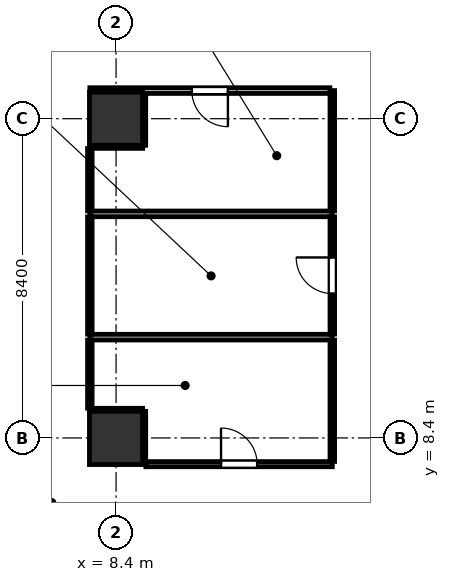
"""IFC4 building model, lengths in metres.
Left out: names, types, materials, properties, quantities, classifications, styles, units other than length and angle.
Written with IfcOpenShell. Run it as: python <this file> out.ifc"""

import sys

from ifc_helpers import new_model, si_unit, direction, frame, frame_2d, origin, origin_2d, place, context, subcontext, project, spatial, rectangle, extrude, element, fill, save


model = new_model("IFC4")
c1 = context("Model", 3, precision=1e-05, world=origin(), true_north=direction((0.0, 1.0)))
c2 = subcontext(c1, "Body", "Model", "MODEL_VIEW")
j1 = project(units=[si_unit("LENGTHUNIT", "METRE"), si_unit("PLANEANGLEUNIT", "RADIAN")], contexts=[c1])
p1 = place(None, origin())
s1 = spatial("IfcSite", under=j1, at=p1, CompositionType="ELEMENT")
p2 = place(p1, origin())
s2 = spatial("IfcBuilding", under=s1, at=p2, CompositionType="ELEMENT")
p3 = place(p2, frame((0.0, 0.0, 5.4)))
s3 = spatial("IfcBuildingStorey", under=s2, at=p3, CompositionType="ELEMENT", Elevation=5.4)
for number, where, z_axis, x_axis in (
    (1, (8.4, 8.4, 0.0), (0.0, 0.0, 1.0), (1.0, 0.0, 0.0)),
    (2, (8.4, 16.8, 0.0), (0.0, 0.0, 1.0), (1.0, 0.0, 0.0)),
):
    element("IfcColumn", number, at=place(p3, frame(where, z_axis=z_axis, x_axis=x_axis)), inside=s3, PredefinedType="COLUMN", context=c2, shape_type="SweptSolid", body=[
        extrude(rectangle(XDim=1.4, YDim=1.4, at=origin_2d()), origin(), (0.0, 0.0, 1.0), 4.8),
    ])
p4 = place(p3, frame((7.71, 14.296, 0.0), z_axis=(0.0, 0.0, 1.0), x_axis=(1.0, 0.0, 0.0)))
e3 = element("IfcWall", 3, at=p4, inside=s3, PredefinedType="PARTITIONING", context=c2, shape_type="SweptSolid", body=[
    extrude(rectangle(XDim=6.38, YDim=0.15, at=frame_2d((3.19, 0.0))), origin(), (0.0, 0.0, 1.0), 3.913),
])
p5 = place(p3, frame((14.09, 14.375, 0.0), z_axis=(0.0, 0.0, 1.0), x_axis=(0.0, 1.0, 0.0)))
e4 = element("IfcWall", 4, at=p5, inside=s3, PredefinedType="PARTITIONING", context=c2, shape_type="SweptSolid", body=[
    extrude(rectangle(XDim=3.165, YDim=0.12, at=frame_2d((1.583, 0.0))), origin(), (0.0, 0.0, 1.0), 3.725),
])
p6 = place(p3, frame((14.026, 17.54, 0.0), z_axis=(0.0, 0.0, 1.0), x_axis=(-1.0, 0.0, 0.0)))
e5 = element("IfcWall", 5, at=p6, inside=s3, PredefinedType="PARTITIONING", context=c2, shape_type="SweptSolid", body=[
    extrude(rectangle(XDim=6.316, YDim=0.15, at=frame_2d((3.158, 0.0))), origin(), (0.0, 0.0, 1.0), 3.913),
])
p7 = place(p6, frame((2.683, 0.0, 0.0)))
e6 = element("IfcOpeningElement", 6, at=p7, cuts=e5, PredefinedType="OPENING", context=c2, shape_type="SweptSolid", body=[
    extrude(rectangle(XDim=0.95, YDim=2.15, at=frame_2d((0.475, 1.075))), frame((0.0, 0.085, 0.0), z_axis=(0.0, -1.0, 0.0), x_axis=(1.0, 0.0, 0.0)), (0.0, 0.0, 1.0), 0.17),
])
p8 = place(p3, frame((9.12, 17.461, 0.0), z_axis=(0.0, 0.0, 1.0), x_axis=(0.0, -1.0, 0.0)))
e7 = element("IfcWall", 7, at=p8, inside=s3, PredefinedType="PARTITIONING", context=c2, shape_type="SweptSolid", body=[
    extrude(rectangle(XDim=1.361, YDim=0.12, at=frame_2d((0.68, 0.0))), origin(), (0.0, 0.0, 1.0), 3.725),
])
p9 = place(p3, frame((9.1, 16.08, 0.0), z_axis=(0.0, 0.0, 1.0), x_axis=(-1.0, 0.0, 0.0)))
e8 = element("IfcWall", 8, at=p9, inside=s3, PredefinedType="PARTITIONING", context=c2, shape_type="SweptSolid", body=[
    extrude(rectangle(XDim=1.39, YDim=0.12, at=frame_2d((0.695, 0.0))), origin(), (0.0, 0.0, 1.0), 3.913),
])
p10 = place(p3, frame((7.71, 16.016, 0.0), z_axis=(0.0, 0.0, 1.0), x_axis=(0.0, -1.0, 0.0)))
e9 = element("IfcWall", 9, at=p10, inside=s3, PredefinedType="PARTITIONING", context=c2, shape_type="SweptSolid", body=[
    extrude(rectangle(XDim=1.641, YDim=0.12, at=frame_2d((0.821, 0.0))), origin(), (0.0, 0.0, 1.0), 4.525),
])
p11 = place(p3, frame((7.71, 11.052, 0.0), z_axis=(0.0, 0.0, 1.0), x_axis=(1.0, 0.0, 0.0)))
e10 = element("IfcWall", 10, at=p11, inside=s3, PredefinedType="PARTITIONING", context=c2, shape_type="SweptSolid", body=[
    extrude(rectangle(XDim=6.38, YDim=0.15, at=frame_2d((3.19, 0.0))), origin(), (0.0, 0.0, 1.0), 3.913),
])
p12 = place(p3, frame((14.09, 11.131, 0.0), z_axis=(0.0, 0.0, 1.0), x_axis=(0.0, 1.0, 0.0)))
e11 = element("IfcWall", 11, at=p12, inside=s3, PredefinedType="PARTITIONING", context=c2, shape_type="SweptSolid", body=[
    extrude(rectangle(XDim=3.086, YDim=0.12, at=frame_2d((1.543, 0.0))), origin(), (0.0, 0.0, 1.0), 4.525),
])
p13 = place(p12, frame((1.068, 0.0, 0.0)))
e12 = element("IfcOpeningElement", 12, at=p13, cuts=e11, PredefinedType="OPENING", context=c2, shape_type="SweptSolid", body=[
    extrude(rectangle(XDim=0.95, YDim=2.15, at=frame_2d((0.475, 1.075))), frame((0.0, 0.07, 0.0), z_axis=(0.0, -1.0, 0.0), x_axis=(1.0, 0.0, 0.0)), (0.0, 0.0, 1.0), 0.14),
])
p14 = place(p3, frame((7.71, 14.217, 0.0), z_axis=(0.0, 0.0, 1.0), x_axis=(0.0, -1.0, 0.0)))
e13 = element("IfcWall", 13, at=p14, inside=s3, PredefinedType="PARTITIONING", context=c2, shape_type="SweptSolid", body=[
    extrude(rectangle(XDim=3.086, YDim=0.12, at=frame_2d((1.543, 0.0))), origin(), (0.0, 0.0, 1.0), 4.525),
])
p15 = place(p3, frame((7.71, 9.12, 0.0), z_axis=(0.0, 0.0, 1.0), x_axis=(1.0, 0.0, 0.0)))
e14 = element("IfcWall", 14, at=p15, inside=s3, PredefinedType="PARTITIONING", context=c2, shape_type="SweptSolid", body=[
    extrude(rectangle(XDim=1.39, YDim=0.12, at=frame_2d((0.695, 0.0))), origin(), (0.0, 0.0, 1.0), 3.913),
])
p16 = place(p3, frame((9.12, 9.1, 0.0), z_axis=(0.0, 0.0, 1.0), x_axis=(0.0, -1.0, 0.0)))
e15 = element("IfcWall", 15, at=p16, inside=s3, PredefinedType="PARTITIONING", context=c2, shape_type="SweptSolid", body=[
    extrude(rectangle(XDim=1.39, YDim=0.12, at=frame_2d((0.695, 0.0))), origin(), (0.0, 0.0, 1.0), 3.725),
])
p17 = place(p3, frame((9.184, 7.71, 0.0), z_axis=(0.0, 0.0, 1.0), x_axis=(1.0, 0.0, 0.0)))
e16 = element("IfcWall", 16, at=p17, inside=s3, PredefinedType="PARTITIONING", context=c2, shape_type="SweptSolid", body=[
    extrude(rectangle(XDim=4.906, YDim=0.135, at=frame_2d((2.453, 0.0))), origin(), (0.0, 0.0, 1.0), 4.122),
])
p18 = place(p17, frame((1.978, 0.0, 0.0)))
e17 = element("IfcOpeningElement", 17, at=p18, cuts=e16, PredefinedType="OPENING", context=c2, shape_type="SweptSolid", body=[
    extrude(rectangle(XDim=0.95, YDim=2.15, at=frame_2d((0.475, 1.075))), frame((0.0, 0.077, 0.0), z_axis=(0.0, -1.0, 0.0), x_axis=(1.0, 0.0, 0.0)), (0.0, 0.0, 1.0), 0.155),
])
p19 = place(p3, frame((14.09, 7.781, 0.0), z_axis=(0.0, 0.0, 1.0), x_axis=(0.0, 1.0, 0.0)))
e18 = element("IfcWall", 18, at=p19, inside=s3, PredefinedType="PARTITIONING", context=c2, shape_type="SweptSolid", body=[
    extrude(rectangle(XDim=3.192, YDim=0.12, at=frame_2d((1.596, 0.0))), origin(), (0.0, 0.0, 1.0), 3.725),
])
p20 = place(p3, frame((7.71, 10.973, 0.0), z_axis=(0.0, 0.0, 1.0), x_axis=(0.0, -1.0, 0.0)))
e19 = element("IfcWall", 19, at=p20, inside=s3, PredefinedType="PARTITIONING", context=c2, shape_type="SweptSolid", body=[
    extrude(rectangle(XDim=1.789, YDim=0.12, at=frame_2d((0.895, 0.0))), origin(), (0.0, 0.0, 1.0), 4.525),
])
p21 = place(p7, origin())
e20 = element("IfcDoor", 20, at=p21, inside=s3, OperationType="SINGLE_SWING_LEFT", PredefinedType="DOOR", context=c2, shape_type="SweptSolid", body=[
    extrude(rectangle(XDim=0.95, YDim=2.15, at=frame_2d((0.475, 1.075))), frame((0.0, 0.025, 0.0), z_axis=(0.0, -1.0, 0.0), x_axis=(1.0, 0.0, 0.0)), (0.0, 0.0, 1.0), 0.05),
])
fill(e6, e20)
p22 = place(p13, origin())
e21 = element("IfcDoor", 21, at=p22, inside=s3, OperationType="SINGLE_SWING_RIGHT", PredefinedType="DOOR", context=c2, shape_type="SweptSolid", body=[
    extrude(rectangle(XDim=0.95, YDim=2.15, at=frame_2d((0.475, 1.075))), frame((0.0, 0.025, 0.0), z_axis=(0.0, -1.0, 0.0), x_axis=(1.0, 0.0, 0.0)), (0.0, 0.0, 1.0), 0.05),
])
fill(e12, e21)
p23 = place(p18, origin())
e22 = element("IfcDoor", 22, at=p23, inside=s3, OperationType="SINGLE_SWING_LEFT", PredefinedType="DOOR", context=c2, shape_type="SweptSolid", body=[
    extrude(rectangle(XDim=0.95, YDim=2.15, at=frame_2d((0.475, 1.075))), frame((0.0, 0.025, 0.0), z_axis=(0.0, -1.0, 0.0), x_axis=(1.0, 0.0, 0.0)), (0.0, 0.0, 1.0), 0.05),
])
fill(e17, e22)
save(model, sys.argv[1])
